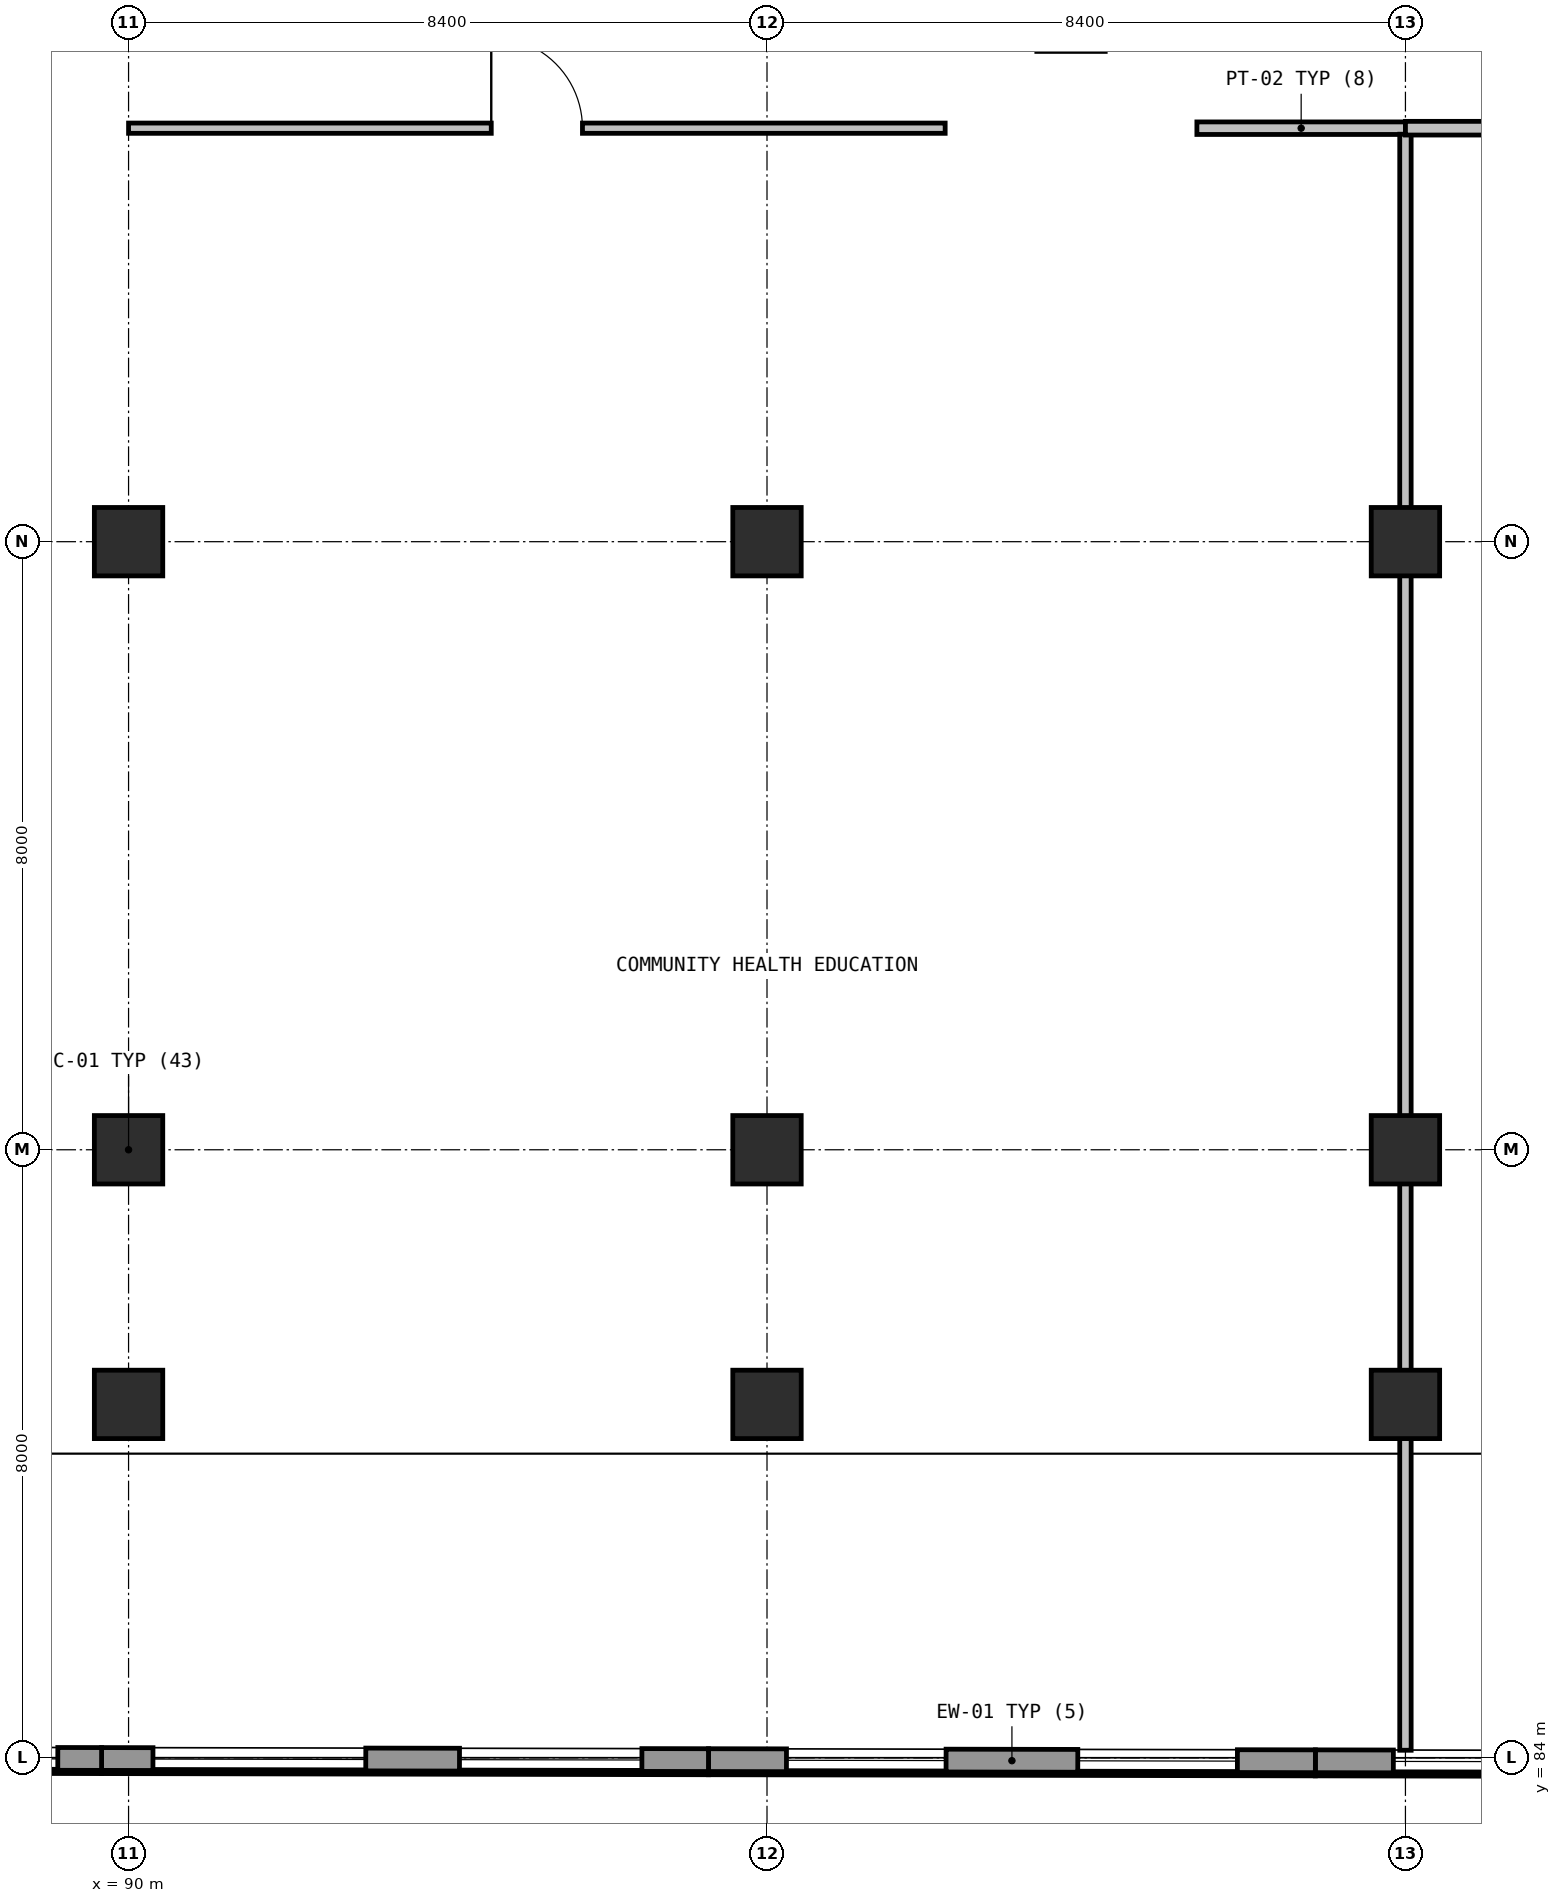
"""IFC4 building model, lengths in metres.
Left out: names, types, materials, properties, quantities, classifications, styles, units other than length and angle.
Written with IfcOpenShell. Run it as: python <this file> out.ifc"""

import sys

from ifc_helpers import new_model, si_unit, direction, frame, frame_2d, origin, origin_2d, place, context, subcontext, project, spatial, rectangle, extrude, element, fill, save


model = new_model("IFC4")
c1 = context("Model", 3, precision=1e-05, world=origin(), true_north=direction((0.0, 1.0)))
c2 = subcontext(c1, "Body", "Model", "MODEL_VIEW")
j1 = project(units=[si_unit("LENGTHUNIT", "METRE"), si_unit("PLANEANGLEUNIT", "RADIAN")], contexts=[c1])
p1 = place(None, origin())
s1 = spatial("IfcSite", under=j1, at=p1, CompositionType="ELEMENT")
p2 = place(p1, origin())
s2 = spatial("IfcBuilding", under=s1, at=p2, CompositionType="ELEMENT")
p3 = place(p2, origin())
s3 = spatial("IfcBuildingStorey", under=s2, at=p3, CompositionType="ELEMENT", Elevation=0.0)
for number, where, z_axis, x_axis in (
    (1, (90.0, 88.65, 0.0), (0.0, 0.0, 1.0), (1.0, 0.0, 0.0)),
    (2, (90.0, 92.0, 0.0), (0.0, 0.0, 1.0), (1.0, 0.0, 0.0)),
    (3, (90.0, 100.0, 0.0), (0.0, 0.0, 1.0), (1.0, 0.0, 0.0)),
    (4, (98.4, 88.65, 0.0), (0.0, 0.0, 1.0), (1.0, 0.0, 0.0)),
    (5, (98.4, 92.0, 0.0), (0.0, 0.0, 1.0), (1.0, 0.0, 0.0)),
    (6, (98.4, 100.0, 0.0), (0.0, 0.0, 1.0), (1.0, 0.0, 0.0)),
    (7, (106.8, 88.65, 0.0), (0.0, 0.0, 1.0), (1.0, 0.0, 0.0)),
    (8, (106.8, 92.0, 0.0), (0.0, 0.0, 1.0), (1.0, 0.0, 0.0)),
    (9, (106.8, 100.0, 0.0), (0.0, 0.0, 1.0), (1.0, 0.0, 0.0)),
):
    element("IfcColumn", number, at=place(p3, frame(where, z_axis=z_axis, x_axis=x_axis)), inside=s3, PredefinedType="COLUMN", context=c2, shape_type="SweptSolid", body=[
        extrude(rectangle(XDim=0.9, YDim=0.9, at=origin_2d()), origin(), (0.0, 0.0, 1.0), 5.4),
    ])
p4 = place(p3, frame((113.6, 83.94, 0.0), z_axis=(0.0, 0.0, 1.0), x_axis=(-0.99999820332, 0.001895615269, 0.0)))
e10 = element("IfcWall", 10, at=p4, inside=s3, PredefinedType="SOLIDWALL", context=c2, shape_type="SweptSolid", body=[
    extrude(rectangle(XDim=7.985, YDim=0.3, at=frame_2d((3.993, 0.0))), origin(), (0.0, 0.0, 1.0), 5.08),
])
p5 = place(p4, frame((1.026, 0.0, 0.96)))
e11 = element("IfcOpeningElement", 11, at=p5, cuts=e10, PredefinedType="OPENING", context=c2, shape_type="SweptSolid", body=[
    extrude(rectangle(XDim=2.1, YDim=1.65, at=frame_2d((1.05, 0.825))), frame((0.0, 0.16, 0.0), z_axis=(0.0, -1.0, 0.0), x_axis=(1.0, 0.0, 0.0)), (0.0, 0.0, 1.0), 0.32),
])
p6 = place(p4, frame((4.859, 0.0, 0.96)))
e12 = element("IfcOpeningElement", 12, at=p6, cuts=e10, PredefinedType="OPENING", context=c2, shape_type="SweptSolid", body=[
    extrude(rectangle(XDim=2.1, YDim=1.65, at=frame_2d((1.05, 0.825))), frame((0.0, 0.16, 0.0), z_axis=(0.0, -1.0, 0.0), x_axis=(1.0, 0.0, 0.0)), (0.0, 0.0, 1.0), 0.32),
])
p7 = place(p3, frame((105.615, 83.955, 0.0), z_axis=(0.0, 0.0, 1.0), x_axis=(-0.99999826081, 0.001865040936, 0.0)))
e13 = element("IfcWall", 13, at=p7, inside=s3, PredefinedType="SOLIDWALL", context=c2, shape_type="SweptSolid", body=[
    extrude(rectangle(XDim=7.985, YDim=0.3, at=frame_2d((3.993, 0.0))), origin(), (0.0, 0.0, 1.0), 5.08),
])
p8 = place(p7, frame((1.026, 0.0, 0.96)))
e14 = element("IfcOpeningElement", 14, at=p8, cuts=e13, PredefinedType="OPENING", context=c2, shape_type="SweptSolid", body=[
    extrude(rectangle(XDim=2.1, YDim=1.65, at=frame_2d((1.05, 0.825))), frame((0.0, 0.16, 0.0), z_axis=(0.0, -1.0, 0.0), x_axis=(1.0, 0.0, 0.0)), (0.0, 0.0, 1.0), 0.32),
])
p9 = place(p7, frame((4.859, 0.0, 0.96)))
e15 = element("IfcOpeningElement", 15, at=p9, cuts=e13, PredefinedType="OPENING", context=c2, shape_type="SweptSolid", body=[
    extrude(rectangle(XDim=2.1, YDim=1.65, at=frame_2d((1.05, 0.825))), frame((0.0, 0.16, 0.0), z_axis=(0.0, -1.0, 0.0), x_axis=(1.0, 0.0, 0.0)), (0.0, 0.0, 1.0), 0.32),
])
p10 = place(p3, frame((97.63, 83.97, 0.0), z_axis=(0.0, 0.0, 1.0), x_axis=(-0.99999820321, 0.001895673228, 0.0)))
e16 = element("IfcWall", 16, at=p10, inside=s3, PredefinedType="SOLIDWALL", context=c2, shape_type="SweptSolid", body=[
    extrude(rectangle(XDim=7.985, YDim=0.3, at=frame_2d((3.992, 0.0))), origin(), (0.0, 0.0, 1.0), 5.08),
])
p11 = place(p10, frame((0.876, 0.0, 0.96)))
e17 = element("IfcOpeningElement", 17, at=p11, cuts=e16, PredefinedType="OPENING", context=c2, shape_type="SweptSolid", body=[
    extrude(rectangle(XDim=2.4, YDim=1.65, at=frame_2d((1.2, 0.825))), frame((0.0, 0.16, 0.0), z_axis=(0.0, -1.0, 0.0), x_axis=(1.0, 0.0, 0.0)), (0.0, 0.0, 1.0), 0.32),
])
p12 = place(p10, frame((4.509, 0.0, 0.96)))
e18 = element("IfcOpeningElement", 18, at=p12, cuts=e16, PredefinedType="OPENING", context=c2, shape_type="SweptSolid", body=[
    extrude(rectangle(XDim=2.8, YDim=1.65, at=frame_2d((1.4, 0.825))), frame((0.0, 0.16, 0.0), z_axis=(0.0, -1.0, 0.0), x_axis=(1.0, 0.0, 0.0)), (0.0, 0.0, 1.0), 0.32),
])
p13 = place(p3, frame((89.645, 83.985, 0.0), z_axis=(0.0, 0.0, 1.0), x_axis=(-0.99999826081, 0.001865040936, 0.0)))
e19 = element("IfcWall", 19, at=p13, inside=s3, PredefinedType="SOLIDWALL", context=c2, shape_type="SweptSolid", body=[
    extrude(rectangle(XDim=7.985, YDim=0.3, at=frame_2d((3.993, 0.0))), origin(), (0.0, 0.0, 1.0), 5.08),
])
p14 = place(p13, frame((0.576, 0.0, 0.96)))
e20 = element("IfcOpeningElement", 20, at=p14, cuts=e19, PredefinedType="OPENING", context=c2, shape_type="SweptSolid", body=[
    extrude(rectangle(XDim=3.0, YDim=1.65, at=frame_2d((1.5, 0.825))), frame((0.0, 0.16, 0.0), z_axis=(0.0, -1.0, 0.0), x_axis=(1.0, 0.0, 0.0)), (0.0, 0.0, 1.0), 0.32),
])
p15 = place(p13, frame((4.309, 0.0, 0.96)))
e21 = element("IfcOpeningElement", 21, at=p15, cuts=e19, PredefinedType="OPENING", context=c2, shape_type="SweptSolid", body=[
    extrude(rectangle(XDim=3.2, YDim=1.65, at=frame_2d((1.6, 0.825))), frame((0.0, 0.16, 0.0), z_axis=(0.0, -1.0, 0.0), x_axis=(1.0, 0.0, 0.0)), (0.0, 0.0, 1.0), 0.32),
])
p16 = place(p3, frame((104.056, 105.44, 0.0), z_axis=(0.0, 0.0, 1.0), x_axis=(1.0, 0.0, 0.0)))
e22 = element("IfcWall", 22, at=p16, inside=s3, PredefinedType="PARTITIONING", context=c2, shape_type="SweptSolid", body=[
    extrude(rectangle(XDim=2.744, YDim=0.165, at=frame_2d((1.372, 0.0))), origin(), (0.0, 0.0, 1.0), 5.08),
])
p17 = place(p3, frame((106.8, 105.361, 0.0), z_axis=(0.0, 0.0, 1.0), x_axis=(0.0, -1.0, 0.0)))
e23 = element("IfcWall", 23, at=p17, inside=s3, PredefinedType="PARTITIONING", context=c2, shape_type="SweptSolid", body=[
    extrude(rectangle(XDim=21.261, YDim=0.15, at=frame_2d((10.63, 0.0))), origin(), (0.0, 0.0, 1.0), 4.33),
])
p18 = place(p3, frame((90.0, 105.44, 0.0), z_axis=(0.0, 0.0, 1.0), x_axis=(1.0, 0.0, 0.0)))
e24 = element("IfcWall", 24, at=p18, inside=s3, PredefinedType="PARTITIONING", context=c2, shape_type="SweptSolid", body=[
    extrude(rectangle(XDim=10.744, YDim=0.135, at=frame_2d((5.372, 0.0))), origin(), (0.0, 0.0, 1.0), 5.08),
])
p19 = place(p18, frame((4.772, 0.0, 0.0)))
e25 = element("IfcOpeningElement", 25, at=p19, cuts=e24, PredefinedType="OPENING", context=c2, shape_type="SweptSolid", body=[
    extrude(rectangle(XDim=1.2, YDim=2.15, at=frame_2d((0.6, 1.075))), frame((0.0, 0.077, 0.0), z_axis=(0.0, -1.0, 0.0), x_axis=(1.0, 0.0, 0.0)), (0.0, 0.0, 1.0), 0.155),
])
p20 = place(p3, frame((106.8, 105.44, 0.0), z_axis=(0.0, 0.0, 1.0), x_axis=(1.0, 0.0, 0.0)))
e26 = element("IfcWall", 26, at=p20, inside=s3, PredefinedType="PARTITIONING", context=c2, shape_type="SweptSolid", body=[
    extrude(rectangle(XDim=6.744, YDim=0.18, at=frame_2d((3.372, 0.0))), origin(), (0.0, 0.0, 1.0), 5.08),
])
p21 = place(p20, frame((2.722, 0.0, 0.0)))
e27 = element("IfcOpeningElement", 27, at=p21, cuts=e26, PredefinedType="OPENING", context=c2, shape_type="SweptSolid", body=[
    extrude(rectangle(XDim=1.3, YDim=2.15, at=frame_2d((0.65, 1.075))), frame((0.0, 0.1, 0.0), z_axis=(0.0, -1.0, 0.0), x_axis=(1.0, 0.0, 0.0)), (0.0, 0.0, 1.0), 0.2),
])
p22 = place(p6, origin())
e28 = element("IfcWindow", 28, at=p22, inside=s3, PartitioningType="SINGLE_PANEL", PredefinedType="WINDOW", context=c2, shape_type="SweptSolid", body=[
    extrude(rectangle(XDim=2.1, YDim=1.65, at=frame_2d((1.05, 0.825))), frame((0.0, 0.03, 0.0), z_axis=(0.0, -1.0, 0.0), x_axis=(1.0, 0.0, 0.0)), (0.0, 0.0, 1.0), 0.06),
])
fill(e12, e28)
p23 = place(p8, origin())
e29 = element("IfcWindow", 29, at=p23, inside=s3, PartitioningType="SINGLE_PANEL", PredefinedType="WINDOW", context=c2, shape_type="SweptSolid", body=[
    extrude(rectangle(XDim=2.1, YDim=1.65, at=frame_2d((1.05, 0.825))), frame((0.0, 0.03, 0.0), z_axis=(0.0, -1.0, 0.0), x_axis=(1.0, 0.0, 0.0)), (0.0, 0.0, 1.0), 0.06),
])
fill(e14, e29)
p24 = place(p9, origin())
e30 = element("IfcWindow", 30, at=p24, inside=s3, PartitioningType="SINGLE_PANEL", PredefinedType="WINDOW", context=c2, shape_type="SweptSolid", body=[
    extrude(rectangle(XDim=2.1, YDim=1.65, at=frame_2d((1.05, 0.825))), frame((0.0, 0.03, 0.0), z_axis=(0.0, -1.0, 0.0), x_axis=(1.0, 0.0, 0.0)), (0.0, 0.0, 1.0), 0.06),
])
fill(e15, e30)
p25 = place(p11, origin())
e31 = element("IfcWindow", 31, at=p25, inside=s3, PartitioningType="SINGLE_PANEL", PredefinedType="WINDOW", context=c2, shape_type="SweptSolid", body=[
    extrude(rectangle(XDim=2.4, YDim=1.65, at=frame_2d((1.2, 0.825))), frame((0.0, 0.03, 0.0), z_axis=(0.0, -1.0, 0.0), x_axis=(1.0, 0.0, 0.0)), (0.0, 0.0, 1.0), 0.06),
])
fill(e17, e31)
p26 = place(p12, origin())
e32 = element("IfcWindow", 32, at=p26, inside=s3, PartitioningType="SINGLE_PANEL", PredefinedType="WINDOW", context=c2, shape_type="SweptSolid", body=[
    extrude(rectangle(XDim=2.8, YDim=1.65, at=frame_2d((1.4, 0.825))), frame((0.0, 0.03, 0.0), z_axis=(0.0, -1.0, 0.0), x_axis=(1.0, 0.0, 0.0)), (0.0, 0.0, 1.0), 0.06),
])
fill(e18, e32)
p27 = place(p14, origin())
e33 = element("IfcWindow", 33, at=p27, inside=s3, PartitioningType="SINGLE_PANEL", PredefinedType="WINDOW", context=c2, shape_type="SweptSolid", body=[
    extrude(rectangle(XDim=3.0, YDim=1.65, at=frame_2d((1.5, 0.825))), frame((0.0, 0.03, 0.0), z_axis=(0.0, -1.0, 0.0), x_axis=(1.0, 0.0, 0.0)), (0.0, 0.0, 1.0), 0.06),
])
fill(e20, e33)
p28 = place(p19, origin())
e34 = element("IfcDoor", 34, at=p28, inside=s3, OperationType="SINGLE_SWING_LEFT", PredefinedType="DOOR", context=c2, shape_type="SweptSolid", body=[
    extrude(rectangle(XDim=1.2, YDim=2.15, at=frame_2d((0.6, 1.075))), frame((0.0, 0.025, 0.0), z_axis=(0.0, -1.0, 0.0), x_axis=(1.0, 0.0, 0.0)), (0.0, 0.0, 1.0), 0.05),
])
fill(e25, e34)
save(model, sys.argv[1])
